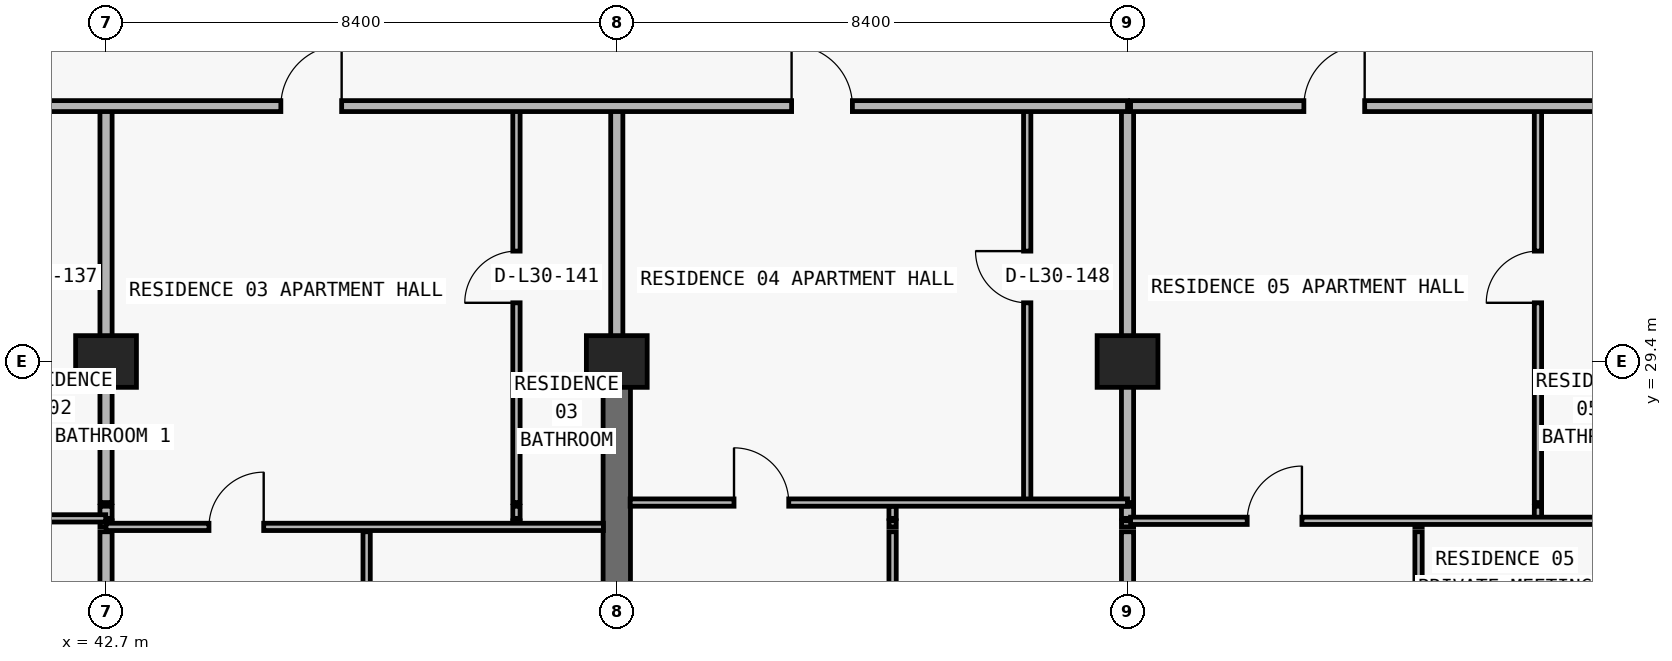
"""IFC4 building model, lengths in metres.
Left out: names, types, materials, properties, quantities, classifications, styles, units other than length and angle.
Written with IfcOpenShell. Run it as: python <this file> out.ifc"""

import sys

from ifc_helpers import new_model, si_unit, direction, frame, frame_2d, origin, origin_2d, place, context, subcontext, project, spatial, rectangle, extrude, element, fill, save


model = new_model("IFC4")
c1 = context("Model", 3, precision=1e-05, world=origin(), true_north=direction((0.0, 1.0)))
c2 = subcontext(c1, "Body", "Model", "MODEL_VIEW")
j1 = project(units=[si_unit("LENGTHUNIT", "METRE"), si_unit("PLANEANGLEUNIT", "RADIAN")], contexts=[c1])
p1 = place(None, origin())
s1 = spatial("IfcSite", under=j1, at=p1, CompositionType="ELEMENT")
p2 = place(p1, origin())
s2 = spatial("IfcBuilding", under=s1, at=p2, CompositionType="ELEMENT")
p3 = place(p2, frame((0.0, 0.0, 112.5)))
s3 = spatial("IfcBuildingStorey", under=s2, at=p3, CompositionType="ELEMENT", Elevation=112.5)
for number, where, z_axis, x_axis in (
    (1, (42.7, 29.4, 0.0), (0.0, 0.0, 1.0), (1.0, 0.0, 0.0)),
    (2, (51.1, 29.4, 0.0), (0.0, 0.0, 1.0), (1.0, 0.0, 0.0)),
    (3, (59.5, 29.4, 0.0), (0.0, 0.0, 1.0), (1.0, 0.0, 0.0)),
):
    element("IfcColumn", number, at=place(p3, frame(where, z_axis=z_axis, x_axis=x_axis)), inside=s3, PredefinedType="COLUMN", context=c2, shape_type="SweptSolid", body=[
        extrude(rectangle(XDim=1.0, YDim=0.85, at=origin_2d()), origin(), (0.0, 0.0, 1.0), 3.05),
    ])
p4 = place(p3, frame((51.1, 20.8, 0.0), z_axis=(0.0, 0.0, 1.0), x_axis=(0.0, 1.0, 0.0)))
e4 = element("IfcWall", 4, at=p4, inside=s3, PredefinedType="SHEAR", context=c2, shape_type="SweptSolid", body=[
    extrude(rectangle(XDim=8.6, YDim=0.45, at=frame_2d((4.3, 0.0))), origin(), (0.0, 0.0, 1.0), 3.05),
])
p5 = place(p3, frame((42.7, 22.22, 0.0), z_axis=(0.0, 0.0, 1.0), x_axis=(0.0, 1.0, 0.0)))
e5 = element("IfcWall", 5, at=p5, inside=s3, PredefinedType="PARTITIONING", context=c2, shape_type="SweptSolid", body=[
    extrude(rectangle(XDim=4.38, YDim=0.2, at=frame_2d((2.19, 0.0))), origin(), (0.0, 0.0, 1.0), 2.174),
])
p6 = place(p3, frame((42.7, 26.68, 0.0), z_axis=(0.0, 0.0, 1.0), x_axis=(0.0, 1.0, 0.0)))
e6 = element("IfcWall", 6, at=p6, inside=s3, PredefinedType="PARTITIONING", context=c2, shape_type="SweptSolid", body=[
    extrude(rectangle(XDim=0.1, YDim=0.2, at=frame_2d((0.05, 0.0))), origin(), (0.0, 0.0, 1.0), 2.174),
])
p7 = place(p3, frame((42.7, 26.82, 0.0), z_axis=(0.0, 0.0, 1.0), x_axis=(0.0, 1.0, 0.0)))
e7 = element("IfcWall", 7, at=p7, inside=s3, PredefinedType="PARTITIONING", context=c2, shape_type="SweptSolid", body=[
    extrude(rectangle(XDim=0.2, YDim=0.2, at=frame_2d((0.1, 0.0))), origin(), (0.0, 0.0, 1.0), 2.174),
])
p8 = place(p3, frame((42.7, 27.08, 0.0), z_axis=(0.0, 0.0, 1.0), x_axis=(0.0, 1.0, 0.0)))
e8 = element("IfcWall", 8, at=p8, inside=s3, PredefinedType="PARTITIONING", context=c2, shape_type="SweptSolid", body=[
    extrude(rectangle(XDim=6.52, YDim=0.2, at=frame_2d((3.26, 0.0))), origin(), (0.0, 0.0, 1.0), 2.174),
])
p9 = place(p3, frame((46.986, 22.22, 0.0), z_axis=(0.0, 0.0, 1.0), x_axis=(0.0, 1.0, 0.0)))
e9 = element("IfcWall", 9, at=p9, inside=s3, PredefinedType="PARTITIONING", context=c2, shape_type="SweptSolid", body=[
    extrude(rectangle(XDim=4.38, YDim=0.12, at=frame_2d((2.19, 0.0))), origin(), (0.0, 0.0, 1.0), 3.05),
])
p10 = place(p9, frame((1.74, 0.0, 0.0)))
e10 = element("IfcOpeningElement", 10, at=p10, cuts=e9, PredefinedType="OPENING", context=c2, shape_type="SweptSolid", body=[
    extrude(rectangle(XDim=0.9, YDim=2.15, at=frame_2d((0.45, 1.075))), frame((0.0, 0.07, 0.0), z_axis=(0.0, -1.0, 0.0), x_axis=(1.0, 0.0, 0.0)), (0.0, 0.0, 1.0), 0.14),
])
p11 = place(p3, frame((49.45, 26.68, 0.0), z_axis=(0.0, 0.0, 1.0), x_axis=(0.0, 1.0, 0.0)))
e11 = element("IfcWall", 11, at=p11, inside=s3, PredefinedType="PARTITIONING", context=c2, shape_type="SweptSolid", body=[
    extrude(rectangle(XDim=0.1, YDim=0.12, at=frame_2d((0.05, 0.0))), origin(), (0.0, 0.0, 1.0), 3.05),
])
p12 = place(p3, frame((49.45, 26.82, 0.0), z_axis=(0.0, 0.0, 1.0), x_axis=(0.0, 1.0, 0.0)))
e12 = element("IfcWall", 12, at=p12, inside=s3, PredefinedType="PARTITIONING", context=c2, shape_type="SweptSolid", body=[
    extrude(rectangle(XDim=0.2, YDim=0.12, at=frame_2d((0.1, 0.0))), origin(), (0.0, 0.0, 1.0), 3.05),
])
p13 = place(p3, frame((49.45, 27.08, 0.0), z_axis=(0.0, 0.0, 1.0), x_axis=(0.0, 1.0, 0.0)))
e13 = element("IfcWall", 13, at=p13, inside=s3, PredefinedType="PARTITIONING", context=c2, shape_type="SweptSolid", body=[
    extrude(rectangle(XDim=6.52, YDim=0.12, at=frame_2d((3.26, 0.0))), origin(), (0.0, 0.0, 1.0), 3.05),
])
p14 = place(p13, frame((3.285, 0.0, 0.0)))
e14 = element("IfcOpeningElement", 14, at=p14, cuts=e13, PredefinedType="OPENING", context=c2, shape_type="SweptSolid", body=[
    extrude(rectangle(XDim=0.85, YDim=2.1, at=frame_2d((0.425, 1.05))), frame((0.0, 0.07, 0.0), z_axis=(0.0, -1.0, 0.0), x_axis=(1.0, 0.0, 0.0)), (0.0, 0.0, 1.0), 0.14),
])
p15 = place(p3, frame((51.1, 29.405, 0.0), z_axis=(0.0, 0.0, 1.0), x_axis=(0.0, 1.0, 0.0)))
e15 = element("IfcWall", 15, at=p15, inside=s3, PredefinedType="PARTITIONING", context=c2, shape_type="SweptSolid", body=[
    extrude(rectangle(XDim=4.195, YDim=0.2, at=frame_2d((2.098, 0.0))), origin(), (0.0, 0.0, 1.0), 2.335),
])
p16 = place(p3, frame((55.636, 22.22, 0.0), z_axis=(0.0, 0.0, 1.0), x_axis=(0.0, 1.0, 0.0)))
e16 = element("IfcWall", 16, at=p16, inside=s3, PredefinedType="PARTITIONING", context=c2, shape_type="SweptSolid", body=[
    extrude(rectangle(XDim=4.38, YDim=0.12, at=frame_2d((2.19, 0.0))), origin(), (0.0, 0.0, 1.0), 3.05),
])
p17 = place(p16, frame((1.74, 0.0, 0.0)))
e17 = element("IfcOpeningElement", 17, at=p17, cuts=e16, PredefinedType="OPENING", context=c2, shape_type="SweptSolid", body=[
    extrude(rectangle(XDim=0.9, YDim=2.15, at=frame_2d((0.45, 1.075))), frame((0.0, 0.07, 0.0), z_axis=(0.0, -1.0, 0.0), x_axis=(1.0, 0.0, 0.0)), (0.0, 0.0, 1.0), 0.14),
])
p18 = place(p3, frame((55.636, 26.68, 0.0), z_axis=(0.0, 0.0, 1.0), x_axis=(0.0, 1.0, 0.0)))
e18 = element("IfcWall", 18, at=p18, inside=s3, PredefinedType="PARTITIONING", context=c2, shape_type="SweptSolid", body=[
    extrude(rectangle(XDim=0.1, YDim=0.12, at=frame_2d((0.05, 0.0))), origin(), (0.0, 0.0, 1.0), 3.05),
])
p19 = place(p3, frame((55.636, 26.82, 0.0), z_axis=(0.0, 0.0, 1.0), x_axis=(0.0, 1.0, 0.0)))
e19 = element("IfcWall", 19, at=p19, inside=s3, PredefinedType="PARTITIONING", context=c2, shape_type="SweptSolid", body=[
    extrude(rectangle(XDim=0.2, YDim=0.12, at=frame_2d((0.1, 0.0))), origin(), (0.0, 0.0, 1.0), 3.05),
])
p20 = place(p3, frame((57.85, 27.08, 0.0), z_axis=(0.0, 0.0, 1.0), x_axis=(0.0, 1.0, 0.0)))
e20 = element("IfcWall", 20, at=p20, inside=s3, PredefinedType="PARTITIONING", context=c2, shape_type="SweptSolid", body=[
    extrude(rectangle(XDim=6.52, YDim=0.12, at=frame_2d((3.26, 0.0))), origin(), (0.0, 0.0, 1.0), 3.05),
])
p21 = place(p20, frame((3.285, 0.0, 0.0)))
e21 = element("IfcOpeningElement", 21, at=p21, cuts=e20, PredefinedType="OPENING", context=c2, shape_type="SweptSolid", body=[
    extrude(rectangle(XDim=0.85, YDim=2.1, at=frame_2d((0.425, 1.05))), frame((0.0, 0.07, 0.0), z_axis=(0.0, -1.0, 0.0), x_axis=(1.0, 0.0, 0.0)), (0.0, 0.0, 1.0), 0.14),
])
p22 = place(p3, frame((59.5, 22.22, 0.0), z_axis=(0.0, 0.0, 1.0), x_axis=(0.0, 1.0, 0.0)))
e22 = element("IfcWall", 22, at=p22, inside=s3, PredefinedType="PARTITIONING", context=c2, shape_type="SweptSolid", body=[
    extrude(rectangle(XDim=4.38, YDim=0.2, at=frame_2d((2.19, 0.0))), origin(), (0.0, 0.0, 1.0), 2.174),
])
p23 = place(p3, frame((59.5, 26.68, 0.0), z_axis=(0.0, 0.0, 1.0), x_axis=(0.0, 1.0, 0.0)))
e23 = element("IfcWall", 23, at=p23, inside=s3, PredefinedType="PARTITIONING", context=c2, shape_type="SweptSolid", body=[
    extrude(rectangle(XDim=0.1, YDim=0.2, at=frame_2d((0.05, 0.0))), origin(), (0.0, 0.0, 1.0), 2.174),
])
p24 = place(p3, frame((59.5, 26.82, 0.0), z_axis=(0.0, 0.0, 1.0), x_axis=(0.0, 1.0, 0.0)))
e24 = element("IfcWall", 24, at=p24, inside=s3, PredefinedType="PARTITIONING", context=c2, shape_type="SweptSolid", body=[
    extrude(rectangle(XDim=0.2, YDim=0.2, at=frame_2d((0.1, 0.0))), origin(), (0.0, 0.0, 1.0), 2.174),
])
p25 = place(p3, frame((59.5, 27.08, 0.0), z_axis=(0.0, 0.0, 1.0), x_axis=(0.0, 1.0, 0.0)))
e25 = element("IfcWall", 25, at=p25, inside=s3, PredefinedType="PARTITIONING", context=c2, shape_type="SweptSolid", body=[
    extrude(rectangle(XDim=6.52, YDim=0.2, at=frame_2d((3.26, 0.0))), origin(), (0.0, 0.0, 1.0), 2.174),
])
p26 = place(p3, frame((64.286, 22.22, 0.0), z_axis=(0.0, 0.0, 1.0), x_axis=(0.0, 1.0, 0.0)))
e26 = element("IfcWall", 26, at=p26, inside=s3, PredefinedType="PARTITIONING", context=c2, shape_type="SweptSolid", body=[
    extrude(rectangle(XDim=4.38, YDim=0.12, at=frame_2d((2.19, 0.0))), origin(), (0.0, 0.0, 1.0), 3.05),
])
p27 = place(p26, frame((1.74, 0.0, 0.0)))
e27 = element("IfcOpeningElement", 27, at=p27, cuts=e26, PredefinedType="OPENING", context=c2, shape_type="SweptSolid", body=[
    extrude(rectangle(XDim=0.9, YDim=2.15, at=frame_2d((0.45, 1.075))), frame((0.0, 0.07, 0.0), z_axis=(0.0, -1.0, 0.0), x_axis=(1.0, 0.0, 0.0)), (0.0, 0.0, 1.0), 0.14),
])
p28 = place(p3, frame((64.286, 26.68, 0.0), z_axis=(0.0, 0.0, 1.0), x_axis=(0.0, 1.0, 0.0)))
e28 = element("IfcWall", 28, at=p28, inside=s3, PredefinedType="PARTITIONING", context=c2, shape_type="SweptSolid", body=[
    extrude(rectangle(XDim=0.1, YDim=0.12, at=frame_2d((0.05, 0.0))), origin(), (0.0, 0.0, 1.0), 3.05),
])
p29 = place(p3, frame((66.25, 26.82, 0.0), z_axis=(0.0, 0.0, 1.0), x_axis=(0.0, 1.0, 0.0)))
e29 = element("IfcWall", 29, at=p29, inside=s3, PredefinedType="PARTITIONING", context=c2, shape_type="SweptSolid", body=[
    extrude(rectangle(XDim=0.2, YDim=0.12, at=frame_2d((0.1, 0.0))), origin(), (0.0, 0.0, 1.0), 3.05),
])
p30 = place(p3, frame((66.25, 27.08, 0.0), z_axis=(0.0, 0.0, 1.0), x_axis=(0.0, 1.0, 0.0)))
e30 = element("IfcWall", 30, at=p30, inside=s3, PredefinedType="PARTITIONING", context=c2, shape_type="SweptSolid", body=[
    extrude(rectangle(XDim=6.52, YDim=0.12, at=frame_2d((3.26, 0.0))), origin(), (0.0, 0.0, 1.0), 3.05),
])
p31 = place(p30, frame((3.285, 0.0, 0.0)))
e31 = element("IfcOpeningElement", 31, at=p31, cuts=e30, PredefinedType="OPENING", context=c2, shape_type="SweptSolid", body=[
    extrude(rectangle(XDim=0.85, YDim=2.1, at=frame_2d((0.425, 1.05))), frame((0.0, 0.07, 0.0), z_axis=(0.0, -1.0, 0.0), x_axis=(1.0, 0.0, 0.0)), (0.0, 0.0, 1.0), 0.14),
])
p32 = place(p3, frame((42.7, 26.68, 0.0), z_axis=(0.0, 0.0, 1.0), x_axis=(1.0, 0.0, 0.0)))
e32 = element("IfcWall", 32, at=p32, inside=s3, PredefinedType="PARTITIONING", context=c2, shape_type="SweptSolid", body=[
    extrude(rectangle(XDim=8.18, YDim=0.12, at=frame_2d((4.09, 0.0))), origin(), (0.0, 0.0, 1.0), 3.05),
])
p33 = place(p32, frame((1.693, 0.0, 0.0)))
e33 = element("IfcOpeningElement", 33, at=p33, cuts=e32, PredefinedType="OPENING", context=c2, shape_type="SweptSolid", body=[
    extrude(rectangle(XDim=0.9, YDim=2.15, at=frame_2d((0.45, 1.075))), frame((0.0, 0.07, 0.0), z_axis=(0.0, -1.0, 0.0), x_axis=(1.0, 0.0, 0.0)), (0.0, 0.0, 1.0), 0.14),
])
p34 = place(p3, frame((59.55, 26.78, 0.0), z_axis=(0.0, 0.0, 1.0), x_axis=(1.0, 0.0, 0.0)))
e34 = element("IfcWall", 34, at=p34, inside=s3, PredefinedType="PARTITIONING", context=c2, shape_type="SweptSolid", body=[
    extrude(rectangle(XDim=8.35, YDim=0.12, at=frame_2d((4.175, 0.0))), origin(), (0.0, 0.0, 1.0), 3.05),
])
p35 = place(p34, frame((1.918, 0.0, 0.0)))
e35 = element("IfcOpeningElement", 35, at=p35, cuts=e34, PredefinedType="OPENING", context=c2, shape_type="SweptSolid", body=[
    extrude(rectangle(XDim=0.9, YDim=2.15, at=frame_2d((0.45, 1.075))), frame((0.0, 0.07, 0.0), z_axis=(0.0, -1.0, 0.0), x_axis=(1.0, 0.0, 0.0)), (0.0, 0.0, 1.0), 0.14),
])
p36 = place(p3, frame((35.1, 26.82, 0.0), z_axis=(0.0, 0.0, 1.0), x_axis=(1.0, 0.0, 0.0)))
e36 = element("IfcWall", 36, at=p36, inside=s3, PredefinedType="PARTITIONING", context=c2, shape_type="SweptSolid", body=[
    extrude(rectangle(XDim=7.595, YDim=0.12, at=frame_2d((3.797, 0.0))), origin(), (0.0, 0.0, 1.0), 3.05),
])
p37 = place(p36, frame((2.6, 0.0, 0.0)))
e37 = element("IfcOpeningElement", 37, at=p37, cuts=e36, PredefinedType="OPENING", context=c2, shape_type="SweptSolid", body=[
    extrude(rectangle(XDim=0.9, YDim=2.15, at=frame_2d((0.45, 1.075))), frame((0.0, 0.07, 0.0), z_axis=(0.0, -1.0, 0.0), x_axis=(1.0, 0.0, 0.0)), (0.0, 0.0, 1.0), 0.14),
])
p38 = place(p3, frame((51.32, 27.08, 0.0), z_axis=(0.0, 0.0, 1.0), x_axis=(1.0, 0.0, 0.0)))
e38 = element("IfcWall", 38, at=p38, inside=s3, PredefinedType="PARTITIONING", context=c2, shape_type="SweptSolid", body=[
    extrude(rectangle(XDim=8.18, YDim=0.12, at=frame_2d((4.09, 0.0))), origin(), (0.0, 0.0, 1.0), 3.05),
])
p39 = place(p38, frame((1.708, 0.0, 0.0)))
e39 = element("IfcOpeningElement", 39, at=p39, cuts=e38, PredefinedType="OPENING", context=c2, shape_type="SweptSolid", body=[
    extrude(rectangle(XDim=0.9, YDim=2.15, at=frame_2d((0.45, 1.075))), frame((0.0, 0.07, 0.0), z_axis=(0.0, -1.0, 0.0), x_axis=(1.0, 0.0, 0.0)), (0.0, 0.0, 1.0), 0.14),
])
p40 = place(p3, frame((18.3, 33.6, 0.0), z_axis=(0.0, 0.0, 1.0), x_axis=(1.0, 0.0, 0.0)))
e40 = element("IfcWall", 40, at=p40, inside=s3, PredefinedType="PARTITIONING", context=c2, shape_type="SweptSolid", body=[
    extrude(rectangle(XDim=41.2, YDim=0.18, at=frame_2d((20.6, 0.0))), origin(), (0.0, 0.0, 1.0), 3.05),
])
p41 = place(p40, frame((11.35, 0.0, 0.0)))
e41 = element("IfcOpeningElement", 41, at=p41, cuts=e40, PredefinedType="OPENING", context=c2, shape_type="SweptSolid", body=[
    extrude(rectangle(XDim=1.0, YDim=2.2, at=frame_2d((0.5, 1.1))), frame((0.0, 0.1, 0.0), z_axis=(0.0, -1.0, 0.0), x_axis=(1.0, 0.0, 0.0)), (0.0, 0.0, 1.0), 0.2),
])
p42 = place(p40, frame((27.275, 0.0, 0.0)))
e42 = element("IfcOpeningElement", 42, at=p42, cuts=e40, PredefinedType="OPENING", context=c2, shape_type="SweptSolid", body=[
    extrude(rectangle(XDim=1.0, YDim=2.2, at=frame_2d((0.5, 1.1))), frame((0.0, 0.1, 0.0), z_axis=(0.0, -1.0, 0.0), x_axis=(1.0, 0.0, 0.0)), (0.0, 0.0, 1.0), 0.2),
])
p43 = place(p40, frame((35.675, 0.0, 0.0)))
e43 = element("IfcOpeningElement", 43, at=p43, cuts=e40, PredefinedType="OPENING", context=c2, shape_type="SweptSolid", body=[
    extrude(rectangle(XDim=1.0, YDim=2.2, at=frame_2d((0.5, 1.1))), frame((0.0, 0.1, 0.0), z_axis=(0.0, -1.0, 0.0), x_axis=(1.0, 0.0, 0.0)), (0.0, 0.0, 1.0), 0.2),
])
p44 = place(p3, frame((59.55, 33.6, 0.0), z_axis=(0.0, 0.0, 1.0), x_axis=(1.0, 0.0, 0.0)))
e44 = element("IfcWall", 44, at=p44, inside=s3, PredefinedType="PARTITIONING", context=c2, shape_type="SweptSolid", body=[
    extrude(rectangle(XDim=10.55, YDim=0.18, at=frame_2d((5.275, 0.0))), origin(), (0.0, 0.0, 1.0), 3.05),
])
p45 = place(p44, frame((2.85, 0.0, 0.0)))
e45 = element("IfcOpeningElement", 45, at=p45, cuts=e44, PredefinedType="OPENING", context=c2, shape_type="SweptSolid", body=[
    extrude(rectangle(XDim=1.0, YDim=2.2, at=frame_2d((0.5, 1.1))), frame((0.0, 0.1, 0.0), z_axis=(0.0, -1.0, 0.0), x_axis=(1.0, 0.0, 0.0)), (0.0, 0.0, 1.0), 0.2),
])
p46 = place(p42, origin())
e46 = element("IfcDoor", 46, at=p46, inside=s3, OperationType="SINGLE_SWING_RIGHT", PredefinedType="DOOR", context=c2, shape_type="SweptSolid", body=[
    extrude(rectangle(XDim=1.0, YDim=2.2, at=frame_2d((0.5, 1.1))), frame((0.0, 0.025, 0.0), z_axis=(0.0, -1.0, 0.0), x_axis=(1.0, 0.0, 0.0)), (0.0, 0.0, 1.0), 0.05),
])
fill(e42, e46)
p47 = place(p14, origin())
e47 = element("IfcDoor", 47, at=p47, inside=s3, OperationType="SINGLE_SWING_LEFT", PredefinedType="DOOR", context=c2, shape_type="SweptSolid", body=[
    extrude(rectangle(XDim=0.85, YDim=2.1, at=frame_2d((0.425, 1.05))), frame((0.0, 0.025, 0.0), z_axis=(0.0, -1.0, 0.0), x_axis=(1.0, 0.0, 0.0)), (0.0, 0.0, 1.0), 0.05),
])
fill(e14, e47)
p48 = place(p33, origin())
e48 = element("IfcDoor", 48, at=p48, inside=s3, OperationType="SINGLE_SWING_RIGHT", PredefinedType="DOOR", context=c2, shape_type="SweptSolid", body=[
    extrude(rectangle(XDim=0.9, YDim=2.15, at=frame_2d((0.45, 1.075))), frame((0.0, 0.025, 0.0), z_axis=(0.0, -1.0, 0.0), x_axis=(1.0, 0.0, 0.0)), (0.0, 0.0, 1.0), 0.05),
])
fill(e33, e48)
p49 = place(p43, origin())
e49 = element("IfcDoor", 49, at=p49, inside=s3, OperationType="SINGLE_SWING_LEFT", PredefinedType="DOOR", context=c2, shape_type="SweptSolid", body=[
    extrude(rectangle(XDim=1.0, YDim=2.2, at=frame_2d((0.5, 1.1))), frame((0.0, 0.025, 0.0), z_axis=(0.0, -1.0, 0.0), x_axis=(1.0, 0.0, 0.0)), (0.0, 0.0, 1.0), 0.05),
])
fill(e43, e49)
p50 = place(p21, origin())
e50 = element("IfcDoor", 50, at=p50, inside=s3, OperationType="SINGLE_SWING_RIGHT", PredefinedType="DOOR", context=c2, shape_type="SweptSolid", body=[
    extrude(rectangle(XDim=0.85, YDim=2.1, at=frame_2d((0.425, 1.05))), frame((0.0, 0.025, 0.0), z_axis=(0.0, -1.0, 0.0), x_axis=(1.0, 0.0, 0.0)), (0.0, 0.0, 1.0), 0.05),
])
fill(e21, e50)
p51 = place(p39, origin())
e51 = element("IfcDoor", 51, at=p51, inside=s3, OperationType="SINGLE_SWING_LEFT", PredefinedType="DOOR", context=c2, shape_type="SweptSolid", body=[
    extrude(rectangle(XDim=0.9, YDim=2.15, at=frame_2d((0.45, 1.075))), frame((0.0, 0.025, 0.0), z_axis=(0.0, -1.0, 0.0), x_axis=(1.0, 0.0, 0.0)), (0.0, 0.0, 1.0), 0.05),
])
fill(e39, e51)
p52 = place(p45, origin())
e52 = element("IfcDoor", 52, at=p52, inside=s3, OperationType="SINGLE_SWING_RIGHT", PredefinedType="DOOR", context=c2, shape_type="SweptSolid", body=[
    extrude(rectangle(XDim=1.0, YDim=2.2, at=frame_2d((0.5, 1.1))), frame((0.0, 0.025, 0.0), z_axis=(0.0, -1.0, 0.0), x_axis=(1.0, 0.0, 0.0)), (0.0, 0.0, 1.0), 0.05),
])
fill(e45, e52)
p53 = place(p31, origin())
e53 = element("IfcDoor", 53, at=p53, inside=s3, OperationType="SINGLE_SWING_LEFT", PredefinedType="DOOR", context=c2, shape_type="SweptSolid", body=[
    extrude(rectangle(XDim=0.85, YDim=2.1, at=frame_2d((0.425, 1.05))), frame((0.0, 0.025, 0.0), z_axis=(0.0, -1.0, 0.0), x_axis=(1.0, 0.0, 0.0)), (0.0, 0.0, 1.0), 0.05),
])
fill(e31, e53)
p54 = place(p35, origin())
e54 = element("IfcDoor", 54, at=p54, inside=s3, OperationType="SINGLE_SWING_RIGHT", PredefinedType="DOOR", context=c2, shape_type="SweptSolid", body=[
    extrude(rectangle(XDim=0.9, YDim=2.15, at=frame_2d((0.45, 1.075))), frame((0.0, 0.025, 0.0), z_axis=(0.0, -1.0, 0.0), x_axis=(1.0, 0.0, 0.0)), (0.0, 0.0, 1.0), 0.05),
])
fill(e35, e54)
save(model, sys.argv[1])
